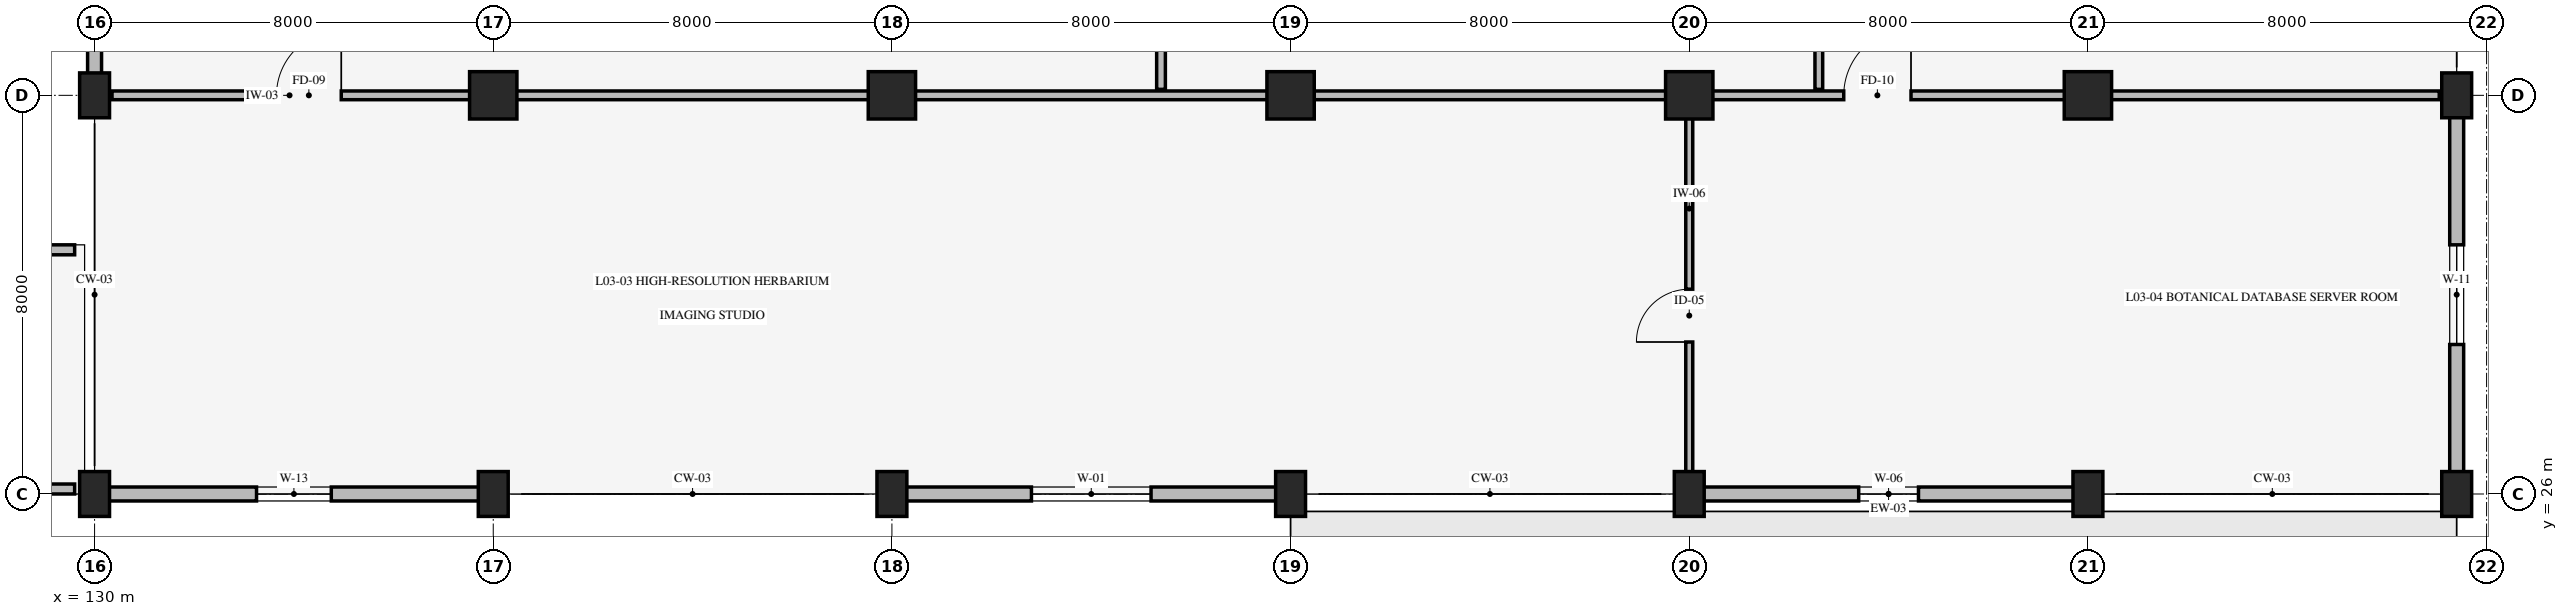
"""IFC4 building model, lengths in metres.
Left out: names, types, materials, properties, quantities, classifications, styles, units other than length and angle.
Written with IfcOpenShell. Run it as: python <this file> out.ifc"""

import sys

from ifc_helpers import new_model, si_unit, direction, frame, frame_2d, origin, origin_2d, place, context, subcontext, project, spatial, rectangle, extrude, element, fill, save


model = new_model("IFC4")
c1 = context("Model", 3, precision=1e-05, world=origin(), true_north=direction((0.0, 1.0)))
c2 = subcontext(c1, "Body", "Model", "MODEL_VIEW")
j1 = project(units=[si_unit("LENGTHUNIT", "METRE"), si_unit("PLANEANGLEUNIT", "RADIAN")], contexts=[c1])
p1 = place(None, origin())
s1 = spatial("IfcSite", under=j1, at=p1, CompositionType="ELEMENT")
p2 = place(p1, origin())
s2 = spatial("IfcBuilding", under=s1, at=p2, CompositionType="ELEMENT")
p3 = place(p2, frame((0.0, 0.0, 10.2)))
s3 = spatial("IfcBuildingStorey", under=s2, at=p3, CompositionType="ELEMENT", Elevation=10.2)
for number, where, z_axis, x_axis in (
    (1, (130.0, 26.0, 0.0), (0.0, 0.0, 1.0), (1.0, 0.0, 0.0)),
    (2, (130.0, 34.0, 0.0), (0.0, 0.0, 1.0), (1.0, 0.0, 0.0)),
    (3, (138.0, 26.0, 0.0), (0.0, 0.0, 1.0), (1.0, 0.0, 0.0)),
):
    element("IfcColumn", number, at=place(p3, frame(where, z_axis=z_axis, x_axis=x_axis)), inside=s3, PredefinedType="COLUMN", context=c2, shape_type="SweptSolid", body=[
        extrude(rectangle(XDim=0.6, YDim=0.9, at=origin_2d()), origin(), (0.0, 0.0, 1.0), 4.8),
    ])
p4 = place(p3, frame((138.0, 34.0, 0.0), z_axis=(0.0, 0.0, 1.0), x_axis=(1.0, 0.0, 0.0)))
e4 = element("IfcColumn", 4, at=p4, inside=s3, PredefinedType="COLUMN", context=c2, shape_type="SweptSolid", body=[
    extrude(rectangle(XDim=0.95, YDim=0.95, at=origin_2d()), origin(), (0.0, 0.0, 1.0), 4.8),
])
p5 = place(p3, frame((146.0, 26.0, 0.0), z_axis=(0.0, 0.0, 1.0), x_axis=(1.0, 0.0, 0.0)))
e5 = element("IfcColumn", 5, at=p5, inside=s3, PredefinedType="COLUMN", context=c2, shape_type="SweptSolid", body=[
    extrude(rectangle(XDim=0.6, YDim=0.9, at=origin_2d()), origin(), (0.0, 0.0, 1.0), 4.8),
])
p6 = place(p3, frame((146.0, 34.0, 0.0), z_axis=(0.0, 0.0, 1.0), x_axis=(1.0, 0.0, 0.0)))
e6 = element("IfcColumn", 6, at=p6, inside=s3, PredefinedType="COLUMN", context=c2, shape_type="SweptSolid", body=[
    extrude(rectangle(XDim=0.95, YDim=0.95, at=origin_2d()), origin(), (0.0, 0.0, 1.0), 4.8),
])
p7 = place(p3, frame((154.0, 26.0, 0.0), z_axis=(0.0, 0.0, 1.0), x_axis=(1.0, 0.0, 0.0)))
e7 = element("IfcColumn", 7, at=p7, inside=s3, PredefinedType="COLUMN", context=c2, shape_type="SweptSolid", body=[
    extrude(rectangle(XDim=0.6, YDim=0.9, at=origin_2d()), origin(), (0.0, 0.0, 1.0), 4.8),
])
p8 = place(p3, frame((154.0, 34.0, 0.0), z_axis=(0.0, 0.0, 1.0), x_axis=(1.0, 0.0, 0.0)))
e8 = element("IfcColumn", 8, at=p8, inside=s3, PredefinedType="COLUMN", context=c2, shape_type="SweptSolid", body=[
    extrude(rectangle(XDim=0.95, YDim=0.95, at=origin_2d()), origin(), (0.0, 0.0, 1.0), 4.8),
])
p9 = place(p3, frame((162.0, 26.0, 0.0), z_axis=(0.0, 0.0, 1.0), x_axis=(1.0, 0.0, 0.0)))
e9 = element("IfcColumn", 9, at=p9, inside=s3, PredefinedType="COLUMN", context=c2, shape_type="SweptSolid", body=[
    extrude(rectangle(XDim=0.6, YDim=0.9, at=origin_2d()), origin(), (0.0, 0.0, 1.0), 4.8),
])
p10 = place(p3, frame((162.0, 34.0, 0.0), z_axis=(0.0, 0.0, 1.0), x_axis=(1.0, 0.0, 0.0)))
e10 = element("IfcColumn", 10, at=p10, inside=s3, PredefinedType="COLUMN", context=c2, shape_type="SweptSolid", body=[
    extrude(rectangle(XDim=0.95, YDim=0.95, at=origin_2d()), origin(), (0.0, 0.0, 1.0), 4.8),
])
p11 = place(p3, frame((170.0, 26.0, 0.0), z_axis=(0.0, 0.0, 1.0), x_axis=(1.0, 0.0, 0.0)))
e11 = element("IfcColumn", 11, at=p11, inside=s3, PredefinedType="COLUMN", context=c2, shape_type="SweptSolid", body=[
    extrude(rectangle(XDim=0.6, YDim=0.9, at=origin_2d()), origin(), (0.0, 0.0, 1.0), 4.8),
])
p12 = place(p3, frame((170.0, 34.0, 0.0), z_axis=(0.0, 0.0, 1.0), x_axis=(1.0, 0.0, 0.0)))
e12 = element("IfcColumn", 12, at=p12, inside=s3, PredefinedType="COLUMN", context=c2, shape_type="SweptSolid", body=[
    extrude(rectangle(XDim=0.95, YDim=0.95, at=origin_2d()), origin(), (0.0, 0.0, 1.0), 4.8),
])
for number, where, z_axis, x_axis in (
    (13, (177.4, 26.0, 0.0), (0.0, 0.0, 1.0), (1.0, 0.0, 0.0)),
    (14, (177.4, 34.0, 0.0), (0.0, 0.0, 1.0), (1.0, 0.0, 0.0)),
):
    element("IfcColumn", number, at=place(p3, frame(where, z_axis=z_axis, x_axis=x_axis)), inside=s3, PredefinedType="COLUMN", context=c2, shape_type="SweptSolid", body=[
        extrude(rectangle(XDim=0.6, YDim=0.9, at=origin_2d()), origin(), (0.0, 0.0, 1.0), 4.8),
    ])
p13 = place(p3, frame((170.0, 26.0, 0.0), z_axis=(0.0, 0.0, 1.0), x_axis=(-1.0, 0.0, 0.0)))
e15 = element("IfcWall", 15, at=p13, inside=s3, PredefinedType="STANDARD", context=c2, shape_type="SweptSolid", body=[
    extrude(rectangle(XDim=8.0, YDim=0.28, at=frame_2d((4.0, 0.0))), origin(), (0.0, 0.0, 1.0), 3.63),
])
p14 = place(p13, frame((3.4, 0.0, 0.85)))
e16 = element("IfcOpeningElement", 16, at=p14, cuts=e15, PredefinedType="OPENING", context=c2, shape_type="SweptSolid", body=[
    extrude(rectangle(XDim=1.2, YDim=1.2, at=frame_2d((0.6, 0.6))), frame((0.0, 0.15, 0.0), z_axis=(0.0, -1.0, 0.0), x_axis=(1.0, 0.0, 0.0)), (0.0, 0.0, 1.0), 0.3),
])
p15 = place(p3, frame((154.0, 26.0, 0.0), z_axis=(0.0, 0.0, 1.0), x_axis=(-1.0, 0.0, 0.0)))
e17 = element("IfcWall", 17, at=p15, inside=s3, PredefinedType="STANDARD", context=c2, shape_type="SweptSolid", body=[
    extrude(rectangle(XDim=8.0, YDim=0.28, at=frame_2d((4.0, 0.0))), origin(), (0.0, 0.0, 1.0), 3.63),
])
p16 = place(p15, frame((2.8, 0.0, 0.85)))
e18 = element("IfcOpeningElement", 18, at=p16, cuts=e17, PredefinedType="OPENING", context=c2, shape_type="SweptSolid", body=[
    extrude(rectangle(XDim=2.4, YDim=1.8, at=frame_2d((1.2, 0.9))), frame((0.0, 0.15, 0.0), z_axis=(0.0, -1.0, 0.0), x_axis=(1.0, 0.0, 0.0)), (0.0, 0.0, 1.0), 0.3),
])
p17 = place(p3, frame((138.0, 26.0, 0.0), z_axis=(0.0, 0.0, 1.0), x_axis=(-1.0, 0.0, 0.0)))
e19 = element("IfcWall", 19, at=p17, inside=s3, PredefinedType="STANDARD", context=c2, shape_type="SweptSolid", body=[
    extrude(rectangle(XDim=8.0, YDim=0.28, at=frame_2d((4.0, 0.0))), origin(), (0.0, 0.0, 1.0), 4.0),
])
p18 = place(p17, frame((3.25, 0.0, 0.85)))
e20 = element("IfcOpeningElement", 20, at=p18, cuts=e19, PredefinedType="OPENING", context=c2, shape_type="SweptSolid", body=[
    extrude(rectangle(XDim=1.5, YDim=2.1, at=frame_2d((0.75, 1.05))), frame((0.0, 0.15, 0.0), z_axis=(0.0, -1.0, 0.0), x_axis=(1.0, 0.0, 0.0)), (0.0, 0.0, 1.0), 0.3),
])
p19 = place(p3, frame((130.0, 34.0, 0.0), z_axis=(0.0, 0.0, 1.0), x_axis=(0.0, 1.0, 0.0)))
e21 = element("IfcWall", 21, at=p19, inside=s3, PredefinedType="STANDARD", context=c2, shape_type="SweptSolid", body=[
    extrude(rectangle(XDim=8.0, YDim=0.28, at=frame_2d((4.0, 0.0))), origin(), (0.0, 0.0, 1.0), 4.0),
])
p20 = place(p19, frame((2.4, 0.0, 0.85)))
e22 = element("IfcOpeningElement", 22, at=p20, cuts=e21, PredefinedType="OPENING", context=c2, shape_type="SweptSolid", body=[
    extrude(rectangle(XDim=3.2, YDim=2.0, at=frame_2d((1.6, 1.0))), frame((0.0, 0.15, 0.0), z_axis=(0.0, -1.0, 0.0), x_axis=(1.0, 0.0, 0.0)), (0.0, 0.0, 1.0), 0.3),
])
p21 = place(p3, frame((177.4, 34.0, 0.0), z_axis=(0.0, 0.0, 1.0), x_axis=(0.0, -1.0, 0.0)))
e23 = element("IfcWall", 23, at=p21, inside=s3, PredefinedType="STANDARD", context=c2, shape_type="SweptSolid", body=[
    extrude(rectangle(XDim=8.0, YDim=0.28, at=frame_2d((4.0, 0.0))), origin(), (0.0, 0.0, 1.0), 3.68),
])
p22 = place(p21, frame((3.0, 0.0, 0.85)))
e24 = element("IfcOpeningElement", 24, at=p22, cuts=e23, PredefinedType="OPENING", context=c2, shape_type="SweptSolid", body=[
    extrude(rectangle(XDim=2.0, YDim=1.5, at=frame_2d((1.0, 0.75))), frame((0.0, 0.15, 0.0), z_axis=(0.0, -1.0, 0.0), x_axis=(1.0, 0.0, 0.0)), (0.0, 0.0, 1.0), 0.3),
])
for number, where, z_axis, x_axis in (
    (25, (66.8, 26.1, 0.0), (0.0, 0.0, 1.0), (1.0, 0.0, 0.0)),
    (26, (129.6, 30.9, 0.0), (0.0, 0.0, 1.0), (-1.0, 0.0, 0.0)),
):
    element("IfcWall", number, at=place(p3, frame(where, z_axis=z_axis, x_axis=x_axis)), inside=s3, PredefinedType="PARAPET", context=c2, shape_type="SweptSolid", body=[
        extrude(rectangle(XDim=62.8, YDim=0.2, at=frame_2d((31.4, 0.0))), origin(), (0.0, 0.0, 1.0), 0.65),
    ])
p23 = place(p3, frame((151.4, 34.12, 0.0), z_axis=(0.0, 0.0, 1.0), x_axis=(0.0, 1.0, 0.0)))
e27 = element("IfcWall", 27, at=p23, inside=s3, PredefinedType="STANDARD", context=c2, shape_type="SweptSolid", body=[
    extrude(rectangle(XDim=23.76, YDim=0.175, at=frame_2d((11.88, 0.0))), origin(), (0.0, 0.0, 1.0), 4.5),
])
p24 = place(p23, frame((11.33, 0.0, 0.0)))
e28 = element("IfcOpeningElement", 28, at=p24, cuts=e27, PredefinedType="OPENING", context=c2, shape_type="SweptSolid", body=[
    extrude(rectangle(XDim=1.1, YDim=2.1, at=frame_2d((0.55, 1.05))), frame((0.0, 0.098, 0.0), z_axis=(0.0, -1.0, 0.0), x_axis=(1.0, 0.0, 0.0)), (0.0, 0.0, 1.0), 0.195),
])
p25 = place(p3, frame((164.6, 34.12, 0.0), z_axis=(0.0, 0.0, 1.0), x_axis=(0.0, 1.0, 0.0)))
e29 = element("IfcWall", 29, at=p25, inside=s3, PredefinedType="STANDARD", context=c2, shape_type="SweptSolid", body=[
    extrude(rectangle(XDim=15.8, YDim=0.155, at=frame_2d((7.9, 0.0))), origin(), (0.0, 0.0, 1.0), 4.5),
])
p26 = place(p25, frame((7.275, 0.0, 0.0)))
e30 = element("IfcOpeningElement", 30, at=p26, cuts=e29, PredefinedType="OPENING", context=c2, shape_type="SweptSolid", body=[
    extrude(rectangle(XDim=1.25, YDim=2.15, at=frame_2d((0.625, 1.075))), frame((0.0, 0.087, 0.0), z_axis=(0.0, -1.0, 0.0), x_axis=(1.0, 0.0, 0.0)), (0.0, 0.0, 1.0), 0.175),
])
p27 = place(p3, frame((130.35, 34.0, 0.0), z_axis=(0.0, 0.0, 1.0), x_axis=(1.0, 0.0, 0.0)))
e31 = element("IfcWall", 31, at=p27, inside=s3, PredefinedType="STANDARD", context=c2, shape_type="SweptSolid", body=[
    extrude(rectangle(XDim=31.3, YDim=0.175, at=frame_2d((15.65, 0.0))), origin(), (0.0, 0.0, 1.0), 3.63),
])
p28 = place(p27, frame((3.3, 0.0, 0.0)))
e32 = element("IfcOpeningElement", 32, at=p28, cuts=e31, PredefinedType="OPENING", context=c2, shape_type="SweptSolid", body=[
    extrude(rectangle(XDim=1.3, YDim=2.15, at=frame_2d((0.65, 1.075))), frame((0.0, 0.098, 0.0), z_axis=(0.0, -1.0, 0.0), x_axis=(1.0, 0.0, 0.0)), (0.0, 0.0, 1.0), 0.195),
])
p29 = place(p3, frame((162.0, 26.05, 0.0), z_axis=(0.0, 0.0, 1.0), x_axis=(0.0, 1.0, 0.0)))
e33 = element("IfcWall", 33, at=p29, inside=s3, PredefinedType="STANDARD", context=c2, shape_type="SweptSolid", body=[
    extrude(rectangle(XDim=7.83, YDim=0.14, at=frame_2d((3.915, 0.0))), origin(), (0.0, 0.0, 1.0), 3.68),
])
p30 = place(p29, frame((3.0, 0.0, 0.0)))
e34 = element("IfcOpeningElement", 34, at=p30, cuts=e33, PredefinedType="OPENING", context=c2, shape_type="SweptSolid", body=[
    extrude(rectangle(XDim=1.06, YDim=2.12, at=frame_2d((0.53, 1.06))), frame((0.0, 0.08, 0.0), z_axis=(0.0, -1.0, 0.0), x_axis=(1.0, 0.0, 0.0)), (0.0, 0.0, 1.0), 0.16),
])
p31 = place(p3, frame((162.35, 34.0, 0.0), z_axis=(0.0, 0.0, 1.0), x_axis=(1.0, 0.0, 0.0)))
e35 = element("IfcWall", 35, at=p31, inside=s3, PredefinedType="STANDARD", context=c2, shape_type="SweptSolid", body=[
    extrude(rectangle(XDim=14.7, YDim=0.175, at=frame_2d((7.35, 0.0))), origin(), (0.0, 0.0, 1.0), 3.63),
])
p32 = place(p31, frame((2.75, 0.0, 0.0)))
e36 = element("IfcOpeningElement", 36, at=p32, cuts=e35, PredefinedType="OPENING", context=c2, shape_type="SweptSolid", body=[
    extrude(rectangle(XDim=1.35, YDim=2.15, at=frame_2d((0.675, 1.075))), frame((0.0, 0.098, 0.0), z_axis=(0.0, -1.0, 0.0), x_axis=(1.0, 0.0, 0.0)), (0.0, 0.0, 1.0), 0.195),
])
p33 = place(p14, origin())
e37 = element("IfcWindow", 37, at=p33, inside=s3, PartitioningType="SINGLE_PANEL", PredefinedType="WINDOW", context=c2, shape_type="SweptSolid", body=[
    extrude(rectangle(XDim=1.2, YDim=1.2, at=frame_2d((0.6, 0.6))), frame((0.0, 0.03, 0.0), z_axis=(0.0, -1.0, 0.0), x_axis=(1.0, 0.0, 0.0)), (0.0, 0.0, 1.0), 0.06),
])
fill(e16, e37)
p34 = place(p16, origin())
e38 = element("IfcWindow", 38, at=p34, inside=s3, PartitioningType="SINGLE_PANEL", PredefinedType="WINDOW", context=c2, shape_type="SweptSolid", body=[
    extrude(rectangle(XDim=2.4, YDim=1.8, at=frame_2d((1.2, 0.9))), frame((0.0, 0.03, 0.0), z_axis=(0.0, -1.0, 0.0), x_axis=(1.0, 0.0, 0.0)), (0.0, 0.0, 1.0), 0.06),
])
fill(e18, e38)
p35 = place(p18, origin())
e39 = element("IfcWindow", 39, at=p35, inside=s3, PartitioningType="SINGLE_PANEL", PredefinedType="WINDOW", context=c2, shape_type="SweptSolid", body=[
    extrude(rectangle(XDim=1.5, YDim=2.1, at=frame_2d((0.75, 1.05))), frame((0.0, 0.03, 0.0), z_axis=(0.0, -1.0, 0.0), x_axis=(1.0, 0.0, 0.0)), (0.0, 0.0, 1.0), 0.06),
])
fill(e20, e39)
p36 = place(p22, origin())
e40 = element("IfcWindow", 40, at=p36, inside=s3, PartitioningType="SINGLE_PANEL", PredefinedType="WINDOW", context=c2, shape_type="SweptSolid", body=[
    extrude(rectangle(XDim=2.0, YDim=1.5, at=frame_2d((1.0, 0.75))), frame((0.0, 0.03, 0.0), z_axis=(0.0, -1.0, 0.0), x_axis=(1.0, 0.0, 0.0)), (0.0, 0.0, 1.0), 0.06),
])
fill(e24, e40)
p37 = place(p28, origin())
e41 = element("IfcDoor", 41, at=p37, inside=s3, OperationType="SINGLE_SWING_RIGHT", PredefinedType="DOOR", context=c2, shape_type="SweptSolid", body=[
    extrude(rectangle(XDim=1.3, YDim=2.15, at=frame_2d((0.65, 1.075))), frame((0.0, 0.025, 0.0), z_axis=(0.0, -1.0, 0.0), x_axis=(1.0, 0.0, 0.0)), (0.0, 0.0, 1.0), 0.05),
])
fill(e32, e41)
p38 = place(p30, origin())
e42 = element("IfcDoor", 42, at=p38, inside=s3, OperationType="SINGLE_SWING_LEFT", PredefinedType="DOOR", context=c2, shape_type="SweptSolid", body=[
    extrude(rectangle(XDim=1.06, YDim=2.12, at=frame_2d((0.53, 1.06))), frame((0.0, 0.025, 0.0), z_axis=(0.0, -1.0, 0.0), x_axis=(1.0, 0.0, 0.0)), (0.0, 0.0, 1.0), 0.05),
])
fill(e34, e42)
p39 = place(p32, origin())
e43 = element("IfcDoor", 43, at=p39, inside=s3, OperationType="SINGLE_SWING_RIGHT", PredefinedType="DOOR", context=c2, shape_type="SweptSolid", body=[
    extrude(rectangle(XDim=1.35, YDim=2.15, at=frame_2d((0.675, 1.075))), frame((0.0, 0.025, 0.0), z_axis=(0.0, -1.0, 0.0), x_axis=(1.0, 0.0, 0.0)), (0.0, 0.0, 1.0), 0.05),
])
fill(e36, e43)
save(model, sys.argv[1])
